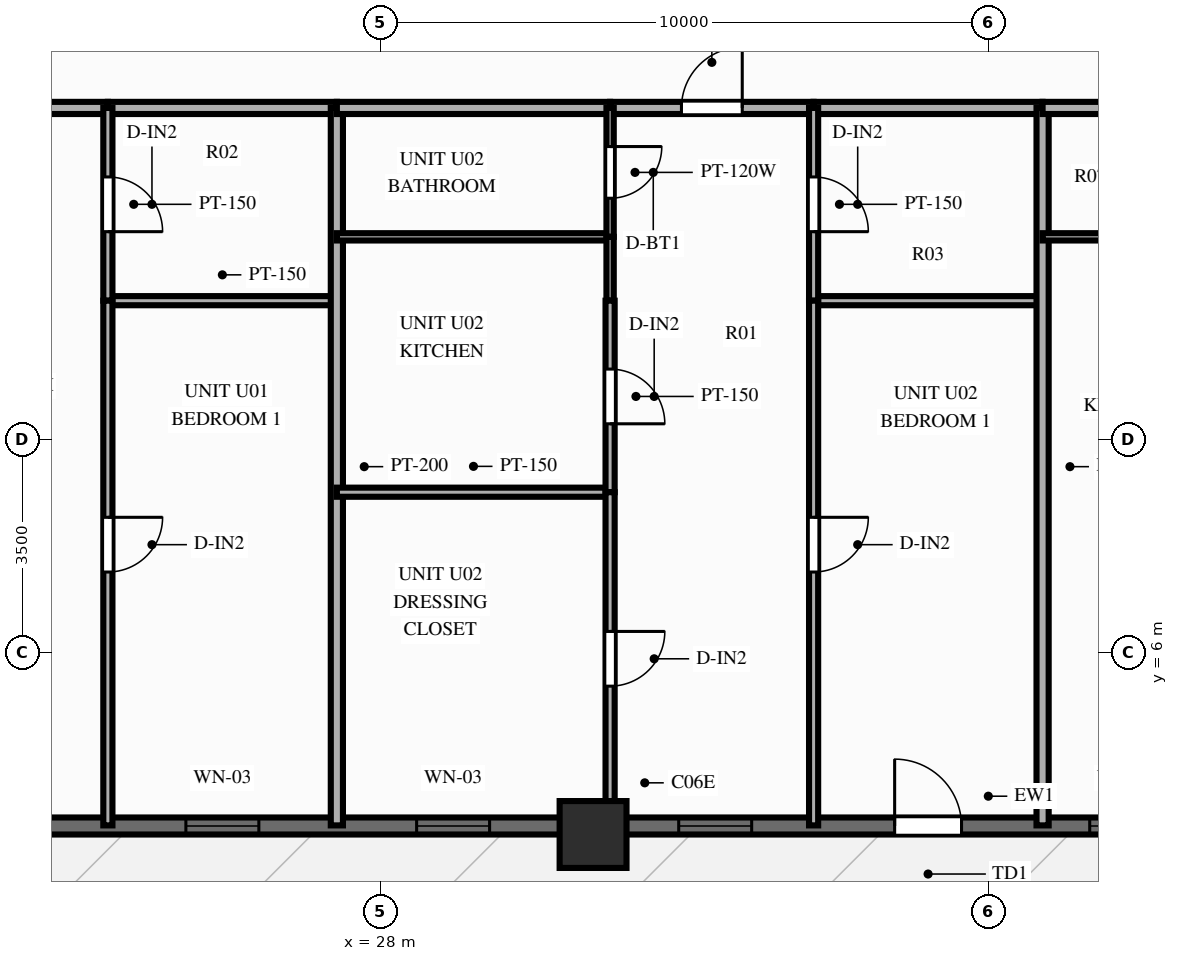
"""IFC4 building model, lengths in metres.
Left out: names, types, materials, properties, quantities, classifications, styles, units other than length and angle.
Written with IfcOpenShell. Run it as: python <this file> out.ifc"""

import sys

from ifc_helpers import new_model, si_unit, direction, frame, frame_2d, origin, origin_2d, place, context, subcontext, project, spatial, rectangle, extrude, source, transform, mapped, element, fill, save


model = new_model("IFC4")
c1 = context("Model", 3, precision=1e-05, world=origin(), true_north=direction((0.0, 1.0)))
c2 = subcontext(c1, "Body", "Model", "MODEL_VIEW")
j1 = project(units=[si_unit("LENGTHUNIT", "METRE"), si_unit("PLANEANGLEUNIT", "RADIAN")], contexts=[c1])
p1 = place(None, origin())
s1 = spatial("IfcSite", under=j1, at=p1, CompositionType="ELEMENT")
p2 = place(p1, origin())
s2 = spatial("IfcBuilding", under=s1, at=p2, CompositionType="ELEMENT")
p3 = place(p2, frame((0.0, 0.0, 34.4)))
s3 = spatial("IfcBuildingStorey", under=s2, at=p3, CompositionType="ELEMENT", Elevation=34.4)
m1 = source(origin(), c2, "Body", "SweptSolid", [
    extrude(rectangle(XDim=1.1, YDim=1.1, at=origin_2d()), origin(), (0.0, 0.0, 1.0), 3.0),
])
p4 = place(p3, frame((31.5, 3.0, 0.0), z_axis=(0.0, 0.0, 1.0), x_axis=(1.0, 0.0, 0.0)))
e1 = element("IfcColumn", 1, at=p4, inside=s3, PredefinedType="COLUMN", context=c2, shape_type="MappedRepresentation", body=[
    mapped(m1, transform((0.0, 0.0, 0.0), scale=1.0)),
])
p5 = place(p3, frame((15.5, 3.14, 0.0), z_axis=(0.0, 0.0, 1.0), x_axis=(1.0, 0.0, 0.0)))
e2 = element("IfcWall", 2, at=p5, inside=s3, PredefinedType="SOLIDWALL", context=c2, shape_type="SweptSolid", body=[
    extrude(rectangle(XDim=45.0, YDim=0.28, at=frame_2d((22.5, 0.0))), origin(), (0.0, 0.0, 1.0), 2.28),
])
p6 = place(p5, frame((1.06, 0.0, 0.25)))
e3 = element("IfcOpeningElement", 3, at=p6, cuts=e2, PredefinedType="OPENING", context=c2, shape_type="SweptSolid", body=[
    extrude(rectangle(XDim=1.2, YDim=1.5, at=frame_2d((0.6, 0.75))), frame((0.0, 0.152, 0.0), z_axis=(0.0, -1.0, 0.0), x_axis=(1.0, 0.0, 0.0)), (0.0, 0.0, 1.0), 0.304),
])
p7 = place(p5, frame((4.875, 0.0, 0.25)))
e4 = element("IfcOpeningElement", 4, at=p7, cuts=e2, PredefinedType="OPENING", context=c2, shape_type="SweptSolid", body=[
    extrude(rectangle(XDim=1.2, YDim=1.5, at=frame_2d((0.6, 0.75))), frame((0.0, 0.152, 0.0), z_axis=(0.0, -1.0, 0.0), x_axis=(1.0, 0.0, 0.0)), (0.0, 0.0, 1.0), 0.304),
])
p8 = place(p5, frame((9.303, 0.0, 0.25)))
e5 = element("IfcOpeningElement", 5, at=p8, cuts=e2, PredefinedType="OPENING", context=c2, shape_type="SweptSolid", body=[
    extrude(rectangle(XDim=1.2, YDim=1.5, at=frame_2d((0.6, 0.75))), frame((0.0, 0.152, 0.0), z_axis=(0.0, -1.0, 0.0), x_axis=(1.0, 0.0, 0.0)), (0.0, 0.0, 1.0), 0.304),
])
p9 = place(p5, frame((13.098, 0.0, 0.25)))
e6 = element("IfcOpeningElement", 6, at=p9, cuts=e2, PredefinedType="OPENING", context=c2, shape_type="SweptSolid", body=[
    extrude(rectangle(XDim=1.2, YDim=1.5, at=frame_2d((0.6, 0.75))), frame((0.0, 0.152, 0.0), z_axis=(0.0, -1.0, 0.0), x_axis=(1.0, 0.0, 0.0)), (0.0, 0.0, 1.0), 0.304),
])
p10 = place(p5, frame((17.408, 0.0, 0.25)))
e7 = element("IfcOpeningElement", 7, at=p10, cuts=e2, PredefinedType="OPENING", context=c2, shape_type="SweptSolid", body=[
    extrude(rectangle(XDim=1.2, YDim=1.5, at=frame_2d((0.6, 0.75))), frame((0.0, 0.152, 0.0), z_axis=(0.0, -1.0, 0.0), x_axis=(1.0, 0.0, 0.0)), (0.0, 0.0, 1.0), 0.304),
])
p11 = place(p5, frame((22.06, 0.0, 0.0), z_axis=(0.0, 0.0, 1.0), x_axis=(-1.0, 0.0, 0.0)))
e8 = element("IfcOpeningElement", 8, at=p11, cuts=e2, PredefinedType="OPENING", context=c2, shape_type="SweptSolid", body=[
    extrude(rectangle(XDim=1.1, YDim=2.15, at=frame_2d((0.55, 1.075))), frame((0.0, 0.152, 0.0), z_axis=(0.0, -1.0, 0.0), x_axis=(1.0, 0.0, 0.0)), (0.0, 0.0, 1.0), 0.304),
])
p12 = place(p5, frame((24.168, 0.0, 0.25)))
e9 = element("IfcOpeningElement", 9, at=p12, cuts=e2, PredefinedType="OPENING", context=c2, shape_type="SweptSolid", body=[
    extrude(rectangle(XDim=1.2, YDim=1.5, at=frame_2d((0.6, 0.75))), frame((0.0, 0.152, 0.0), z_axis=(0.0, -1.0, 0.0), x_axis=(1.0, 0.0, 0.0)), (0.0, 0.0, 1.0), 0.304),
])
p13 = place(p5, frame((26.776, 0.0, 0.25)))
e10 = element("IfcOpeningElement", 10, at=p13, cuts=e2, PredefinedType="OPENING", context=c2, shape_type="SweptSolid", body=[
    extrude(rectangle(XDim=1.2, YDim=1.5, at=frame_2d((0.6, 0.75))), frame((0.0, 0.152, 0.0), z_axis=(0.0, -1.0, 0.0), x_axis=(1.0, 0.0, 0.0)), (0.0, 0.0, 1.0), 0.304),
])
p14 = place(p5, frame((31.613, 0.0, 0.25)))
e11 = element("IfcOpeningElement", 11, at=p14, cuts=e2, PredefinedType="OPENING", context=c2, shape_type="SweptSolid", body=[
    extrude(rectangle(XDim=1.2, YDim=1.5, at=frame_2d((0.6, 0.75))), frame((0.0, 0.152, 0.0), z_axis=(0.0, -1.0, 0.0), x_axis=(1.0, 0.0, 0.0)), (0.0, 0.0, 1.0), 0.304),
])
p15 = place(p5, frame((34.881, 0.0, 0.25)))
e12 = element("IfcOpeningElement", 12, at=p15, cuts=e2, PredefinedType="OPENING", context=c2, shape_type="SweptSolid", body=[
    extrude(rectangle(XDim=1.2, YDim=1.5, at=frame_2d((0.6, 0.75))), frame((0.0, 0.152, 0.0), z_axis=(0.0, -1.0, 0.0), x_axis=(1.0, 0.0, 0.0)), (0.0, 0.0, 1.0), 0.304),
])
p16 = place(p5, frame((38.355, 0.0, 0.25)))
e13 = element("IfcOpeningElement", 13, at=p16, cuts=e2, PredefinedType="OPENING", context=c2, shape_type="SweptSolid", body=[
    extrude(rectangle(XDim=1.2, YDim=1.5, at=frame_2d((0.6, 0.75))), frame((0.0, 0.152, 0.0), z_axis=(0.0, -1.0, 0.0), x_axis=(1.0, 0.0, 0.0)), (0.0, 0.0, 1.0), 0.304),
])
p17 = place(p5, frame((42.232, 0.0, 0.25)))
e14 = element("IfcOpeningElement", 14, at=p17, cuts=e2, PredefinedType="OPENING", context=c2, shape_type="SweptSolid", body=[
    extrude(rectangle(XDim=1.2, YDim=1.5, at=frame_2d((0.6, 0.75))), frame((0.0, 0.152, 0.0), z_axis=(0.0, -1.0, 0.0), x_axis=(1.0, 0.0, 0.0)), (0.0, 0.0, 1.0), 0.304),
])
p18 = place(p3, frame((18.43, 14.95, 0.0), z_axis=(0.0, 0.0, 1.0), x_axis=(1.0, 0.0, 0.0)))
e15 = element("IfcWall", 15, at=p18, inside=s3, PredefinedType="PARTITIONING", context=c2, shape_type="SweptSolid", body=[
    extrude(rectangle(XDim=5.091, YDim=0.2, at=frame_2d((2.545, 0.0))), origin(), (0.0, 0.0, 1.0), 2.79),
])
p19 = place(p18, frame((2.045, 0.0, 0.0)))
e16 = element("IfcOpeningElement", 16, at=p19, cuts=e15, PredefinedType="OPENING", context=c2, shape_type="SweptSolid", body=[
    extrude(rectangle(XDim=1.0, YDim=2.15, at=frame_2d((0.5, 1.075))), frame((0.0, 0.112, 0.0), z_axis=(0.0, -1.0, 0.0), x_axis=(1.0, 0.0, 0.0)), (0.0, 0.0, 1.0), 0.224),
])
p20 = place(p3, frame((23.521, 14.95, 0.0), z_axis=(0.0, 0.0, 1.0), x_axis=(1.0, 0.0, 0.0)))
e17 = element("IfcWall", 17, at=p20, inside=s3, PredefinedType="PARTITIONING", context=c2, shape_type="SweptSolid", body=[
    extrude(rectangle(XDim=3.766, YDim=0.2, at=frame_2d((1.883, 0.0))), origin(), (0.0, 0.0, 1.0), 2.79),
])
p21 = place(p3, frame((23.521, 11.78, 0.0), z_axis=(0.0, 0.0, 1.0), x_axis=(1.0, 0.0, 0.0)))
e18 = element("IfcWall", 18, at=p21, inside=s3, PredefinedType="PARTITIONING", context=c2, shape_type="SweptSolid", body=[
    extrude(rectangle(XDim=3.766, YDim=0.15, at=frame_2d((1.883, 0.0))), origin(), (0.0, 0.0, 1.0), 2.79),
])
p22 = place(p3, frame((23.521, 14.95, 0.0), z_axis=(0.0, 0.0, 1.0), x_axis=(0.0, -1.0, 0.0)))
e19 = element("IfcWall", 19, at=p22, inside=s3, PredefinedType="PARTITIONING", context=c2, shape_type="SweptSolid", body=[
    extrude(rectangle(XDim=3.17, YDim=0.15, at=frame_2d((1.585, 0.0))), origin(), (0.0, 0.0, 1.0), 2.79),
])
p23 = place(p22, frame((1.135, 0.0, 0.0)))
e20 = element("IfcOpeningElement", 20, at=p23, cuts=e19, PredefinedType="OPENING", context=c2, shape_type="SweptSolid", body=[
    extrude(rectangle(XDim=0.9, YDim=2.1, at=frame_2d((0.45, 1.05))), frame((0.0, 0.087, 0.0), z_axis=(0.0, -1.0, 0.0), x_axis=(1.0, 0.0, 0.0)), (0.0, 0.0, 1.0), 0.174),
])
p24 = place(p3, frame((23.521, 11.78, 0.0), z_axis=(0.0, 0.0, 1.0), x_axis=(0.0, -1.0, 0.0)))
e21 = element("IfcWall", 21, at=p24, inside=s3, PredefinedType="PARTITIONING", context=c2, shape_type="SweptSolid", body=[
    extrude(rectangle(XDim=8.63, YDim=0.15, at=frame_2d((4.315, 0.0))), origin(), (0.0, 0.0, 1.0), 2.79),
])
p25 = place(p24, frame((3.563, 0.0, 0.0)))
e22 = element("IfcOpeningElement", 22, at=p25, cuts=e21, PredefinedType="OPENING", context=c2, shape_type="SweptSolid", body=[
    extrude(rectangle(XDim=0.9, YDim=2.1, at=frame_2d((0.45, 1.05))), frame((0.0, 0.087, 0.0), z_axis=(0.0, -1.0, 0.0), x_axis=(1.0, 0.0, 0.0)), (0.0, 0.0, 1.0), 0.174),
])
p26 = place(p3, frame((27.286, 14.95, 0.0), z_axis=(0.0, 0.0, 1.0), x_axis=(0.0, -1.0, 0.0)))
e23 = element("IfcWall", 23, at=p26, inside=s3, PredefinedType="PARTITIONING", context=c2, shape_type="SweptSolid", body=[
    extrude(rectangle(XDim=11.8, YDim=0.2, at=frame_2d((5.9, 0.0))), origin(), (0.0, 0.0, 1.0), 2.79),
])
p27 = place(p3, frame((27.286, 14.95, 0.0), z_axis=(0.0, 0.0, 1.0), x_axis=(1.0, 0.0, 0.0)))
e24 = element("IfcWall", 24, at=p27, inside=s3, PredefinedType="PARTITIONING", context=c2, shape_type="SweptSolid", body=[
    extrude(rectangle(XDim=4.494, YDim=0.2, at=frame_2d((2.247, 0.0))), origin(), (0.0, 0.0, 1.0), 2.79),
])
p28 = place(p3, frame((31.78, 14.95, 0.0), z_axis=(0.0, 0.0, 1.0), x_axis=(1.0, 0.0, 0.0)))
e25 = element("IfcWall", 25, at=p28, inside=s3, PredefinedType="PARTITIONING", context=c2, shape_type="SweptSolid", body=[
    extrude(rectangle(XDim=3.347, YDim=0.2, at=frame_2d((1.673, 0.0))), origin(), (0.0, 0.0, 1.0), 2.79),
])
p29 = place(p28, frame((1.173, 0.0, 0.0)))
e26 = element("IfcOpeningElement", 26, at=p29, cuts=e25, PredefinedType="OPENING", context=c2, shape_type="SweptSolid", body=[
    extrude(rectangle(XDim=1.0, YDim=2.15, at=frame_2d((0.5, 1.075))), frame((0.0, 0.112, 0.0), z_axis=(0.0, -1.0, 0.0), x_axis=(1.0, 0.0, 0.0)), (0.0, 0.0, 1.0), 0.224),
])
p30 = place(p3, frame((35.127, 14.95, 0.0), z_axis=(0.0, 0.0, 1.0), x_axis=(1.0, 0.0, 0.0)))
e27 = element("IfcWall", 27, at=p30, inside=s3, PredefinedType="PARTITIONING", context=c2, shape_type="SweptSolid", body=[
    extrude(rectangle(XDim=3.766, YDim=0.2, at=frame_2d((1.883, 0.0))), origin(), (0.0, 0.0, 1.0), 2.79),
])
p31 = place(p3, frame((27.286, 12.83, 0.0), z_axis=(0.0, 0.0, 1.0), x_axis=(1.0, 0.0, 0.0)))
e28 = element("IfcWall", 28, at=p31, inside=s3, PredefinedType="PARTITIONING", context=c2, shape_type="SweptSolid", body=[
    extrude(rectangle(XDim=4.494, YDim=0.12, at=frame_2d((2.247, 0.0))), origin(), (0.0, 0.0, 1.0), 2.79),
])
p32 = place(p3, frame((35.127, 11.78, 0.0), z_axis=(0.0, 0.0, 1.0), x_axis=(1.0, 0.0, 0.0)))
e29 = element("IfcWall", 29, at=p32, inside=s3, PredefinedType="PARTITIONING", context=c2, shape_type="SweptSolid", body=[
    extrude(rectangle(XDim=3.766, YDim=0.15, at=frame_2d((1.883, 0.0))), origin(), (0.0, 0.0, 1.0), 2.79),
])
p33 = place(p3, frame((31.78, 14.95, 0.0), z_axis=(0.0, 0.0, 1.0), x_axis=(0.0, -1.0, 0.0)))
e30 = element("IfcWall", 30, at=p33, inside=s3, PredefinedType="PARTITIONING", context=c2, shape_type="SweptSolid", body=[
    extrude(rectangle(XDim=2.12, YDim=0.12, at=frame_2d((1.06, 0.0))), origin(), (0.0, 0.0, 1.0), 2.79),
])
p34 = place(p33, frame((0.635, 0.0, 0.0)))
e31 = element("IfcOpeningElement", 31, at=p34, cuts=e30, PredefinedType="OPENING", context=c2, shape_type="SweptSolid", body=[
    extrude(rectangle(XDim=0.85, YDim=2.05, at=frame_2d((0.425, 1.025))), frame((0.0, 0.072, 0.0), z_axis=(0.0, -1.0, 0.0), x_axis=(1.0, 0.0, 0.0)), (0.0, 0.0, 1.0), 0.144),
])
p35 = place(p3, frame((31.78, 12.83, 0.0), z_axis=(0.0, 0.0, 1.0), x_axis=(0.0, -1.0, 0.0)))
e32 = element("IfcWall", 32, at=p35, inside=s3, PredefinedType="PARTITIONING", context=c2, shape_type="SweptSolid", body=[
    extrude(rectangle(XDim=1.05, YDim=0.12, at=frame_2d((0.525, 0.0))), origin(), (0.0, 0.0, 1.0), 2.79),
])
p36 = place(p3, frame((27.286, 8.63, 0.0), z_axis=(0.0, 0.0, 1.0), x_axis=(1.0, 0.0, 0.0)))
e33 = element("IfcWall", 33, at=p36, inside=s3, PredefinedType="PARTITIONING", context=c2, shape_type="SweptSolid", body=[
    extrude(rectangle(XDim=4.494, YDim=0.15, at=frame_2d((2.247, 0.0))), origin(), (0.0, 0.0, 1.0), 2.79),
])
p37 = place(p3, frame((31.78, 11.78, 0.0), z_axis=(0.0, 0.0, 1.0), x_axis=(0.0, -1.0, 0.0)))
e34 = element("IfcWall", 34, at=p37, inside=s3, PredefinedType="PARTITIONING", context=c2, shape_type="SweptSolid", body=[
    extrude(rectangle(XDim=3.15, YDim=0.15, at=frame_2d((1.575, 0.0))), origin(), (0.0, 0.0, 1.0), 2.79),
])
p38 = place(p37, frame((1.125, 0.0, 0.0)))
e35 = element("IfcOpeningElement", 35, at=p38, cuts=e34, PredefinedType="OPENING", context=c2, shape_type="SweptSolid", body=[
    extrude(rectangle(XDim=0.9, YDim=2.1, at=frame_2d((0.45, 1.05))), frame((0.0, 0.087, 0.0), z_axis=(0.0, -1.0, 0.0), x_axis=(1.0, 0.0, 0.0)), (0.0, 0.0, 1.0), 0.174),
])
p39 = place(p3, frame((31.78, 8.63, 0.0), z_axis=(0.0, 0.0, 1.0), x_axis=(0.0, -1.0, 0.0)))
e36 = element("IfcWall", 36, at=p39, inside=s3, PredefinedType="PARTITIONING", context=c2, shape_type="SweptSolid", body=[
    extrude(rectangle(XDim=5.48, YDim=0.15, at=frame_2d((2.74, 0.0))), origin(), (0.0, 0.0, 1.0), 2.79),
])
p40 = place(p39, frame((2.29, 0.0, 0.0)))
e37 = element("IfcOpeningElement", 37, at=p40, cuts=e36, PredefinedType="OPENING", context=c2, shape_type="SweptSolid", body=[
    extrude(rectangle(XDim=0.9, YDim=2.1, at=frame_2d((0.45, 1.05))), frame((0.0, 0.087, 0.0), z_axis=(0.0, -1.0, 0.0), x_axis=(1.0, 0.0, 0.0)), (0.0, 0.0, 1.0), 0.174),
])
p41 = place(p3, frame((35.127, 14.95, 0.0), z_axis=(0.0, 0.0, 1.0), x_axis=(0.0, -1.0, 0.0)))
e38 = element("IfcWall", 38, at=p41, inside=s3, PredefinedType="PARTITIONING", context=c2, shape_type="SweptSolid", body=[
    extrude(rectangle(XDim=3.17, YDim=0.15, at=frame_2d((1.585, 0.0))), origin(), (0.0, 0.0, 1.0), 2.79),
])
p42 = place(p41, frame((1.135, 0.0, 0.0)))
e39 = element("IfcOpeningElement", 39, at=p42, cuts=e38, PredefinedType="OPENING", context=c2, shape_type="SweptSolid", body=[
    extrude(rectangle(XDim=0.9, YDim=2.1, at=frame_2d((0.45, 1.05))), frame((0.0, 0.087, 0.0), z_axis=(0.0, -1.0, 0.0), x_axis=(1.0, 0.0, 0.0)), (0.0, 0.0, 1.0), 0.174),
])
p43 = place(p3, frame((35.127, 11.78, 0.0), z_axis=(0.0, 0.0, 1.0), x_axis=(0.0, -1.0, 0.0)))
e40 = element("IfcWall", 40, at=p43, inside=s3, PredefinedType="PARTITIONING", context=c2, shape_type="SweptSolid", body=[
    extrude(rectangle(XDim=8.63, YDim=0.15, at=frame_2d((4.315, 0.0))), origin(), (0.0, 0.0, 1.0), 2.79),
])
p44 = place(p43, frame((3.563, 0.0, 0.0)))
e41 = element("IfcOpeningElement", 41, at=p44, cuts=e40, PredefinedType="OPENING", context=c2, shape_type="SweptSolid", body=[
    extrude(rectangle(XDim=0.9, YDim=2.1, at=frame_2d((0.45, 1.05))), frame((0.0, 0.087, 0.0), z_axis=(0.0, -1.0, 0.0), x_axis=(1.0, 0.0, 0.0)), (0.0, 0.0, 1.0), 0.174),
])
p45 = place(p3, frame((38.893, 14.95, 0.0), z_axis=(0.0, 0.0, 1.0), x_axis=(0.0, -1.0, 0.0)))
e42 = element("IfcWall", 42, at=p45, inside=s3, PredefinedType="PARTITIONING", context=c2, shape_type="SweptSolid", body=[
    extrude(rectangle(XDim=11.8, YDim=0.2, at=frame_2d((5.9, 0.0))), origin(), (0.0, 0.0, 1.0), 2.79),
])
p46 = place(p3, frame((38.893, 14.95, 0.0), z_axis=(0.0, 0.0, 1.0), x_axis=(1.0, 0.0, 0.0)))
e43 = element("IfcWall", 43, at=p46, inside=s3, PredefinedType="PARTITIONING", context=c2, shape_type="SweptSolid", body=[
    extrude(rectangle(XDim=2.75, YDim=0.2, at=frame_2d((1.375, 0.0))), origin(), (0.0, 0.0, 1.0), 2.79),
])
p47 = place(p3, frame((38.893, 12.83, 0.0), z_axis=(0.0, 0.0, 1.0), x_axis=(1.0, 0.0, 0.0)))
e44 = element("IfcWall", 44, at=p47, inside=s3, PredefinedType="PARTITIONING", context=c2, shape_type="SweptSolid", body=[
    extrude(rectangle(XDim=2.75, YDim=0.12, at=frame_2d((1.375, 0.0))), origin(), (0.0, 0.0, 1.0), 2.79),
])
m2 = source(origin(), c2, "Body", "SweptSolid", [
    extrude(rectangle(XDim=1.2, YDim=1.5, at=frame_2d((0.6, 0.75))), frame((0.0, 0.03, 0.0), z_axis=(0.0, -1.0, 0.0), x_axis=(1.0, 0.0, 0.0)), (0.0, 0.0, 1.0), 0.06),
])
p48 = place(p8, origin())
e45 = element("IfcWindow", 45, at=p48, inside=s3, PartitioningType="SINGLE_PANEL", PredefinedType="WINDOW", context=c2, shape_type="MappedRepresentation", body=[
    mapped(m2, transform((0.0, 0.0, 0.0), scale=1.0)),
])
fill(e5, e45)
p49 = place(p9, origin())
e46 = element("IfcWindow", 46, at=p49, inside=s3, PartitioningType="SINGLE_PANEL", PredefinedType="WINDOW", context=c2, shape_type="MappedRepresentation", body=[
    mapped(m2, transform((0.0, 0.0, 0.0), scale=1.0)),
])
fill(e6, e46)
p50 = place(p10, origin())
e47 = element("IfcWindow", 47, at=p50, inside=s3, PartitioningType="SINGLE_PANEL", PredefinedType="WINDOW", context=c2, shape_type="MappedRepresentation", body=[
    mapped(m2, transform((0.0, 0.0, 0.0), scale=1.0)),
])
fill(e7, e47)
m3 = source(origin(), c2, "Body", "SweptSolid", [
    extrude(rectangle(XDim=1.1, YDim=2.15, at=frame_2d((0.55, 1.075))), frame((0.0, 0.025, 0.0), z_axis=(0.0, -1.0, 0.0), x_axis=(1.0, 0.0, 0.0)), (0.0, 0.0, 1.0), 0.05),
])
p51 = place(p11, origin())
e48 = element("IfcDoor", 48, at=p51, inside=s3, OperationType="SINGLE_SWING_RIGHT", PredefinedType="DOOR", context=c2, shape_type="MappedRepresentation", body=[
    mapped(m3, transform((0.0, 0.0, 0.0), scale=1.0)),
])
fill(e8, e48)
p52 = place(p12, origin())
e49 = element("IfcWindow", 49, at=p52, inside=s3, PartitioningType="SINGLE_PANEL", PredefinedType="WINDOW", context=c2, shape_type="MappedRepresentation", body=[
    mapped(m2, transform((0.0, 0.0, 0.0), scale=1.0)),
])
fill(e9, e49)
m4 = source(origin(), c2, "Body", "SweptSolid", [
    extrude(rectangle(XDim=0.9, YDim=2.1, at=frame_2d((0.45, 1.05))), frame((0.0, 0.025, 0.0), z_axis=(0.0, -1.0, 0.0), x_axis=(1.0, 0.0, 0.0)), (0.0, 0.0, 1.0), 0.05),
])
p53 = place(p23, origin())
e50 = element("IfcDoor", 50, at=p53, inside=s3, OperationType="SINGLE_SWING_RIGHT", PredefinedType="DOOR", context=c2, shape_type="MappedRepresentation", body=[
    mapped(m4, transform((0.0, 0.0, 0.0), scale=1.0)),
])
fill(e20, e50)
p54 = place(p25, origin())
e51 = element("IfcDoor", 51, at=p54, inside=s3, OperationType="SINGLE_SWING_LEFT", PredefinedType="DOOR", context=c2, shape_type="MappedRepresentation", body=[
    mapped(m4, transform((0.0, 0.0, 0.0), scale=1.0)),
])
fill(e22, e51)
m5 = source(origin(), c2, "Body", "SweptSolid", [
    extrude(rectangle(XDim=1.0, YDim=2.15, at=frame_2d((0.5, 1.075))), frame((0.0, 0.025, 0.0), z_axis=(0.0, -1.0, 0.0), x_axis=(1.0, 0.0, 0.0)), (0.0, 0.0, 1.0), 0.05),
])
p55 = place(p29, origin())
e52 = element("IfcDoor", 52, at=p55, inside=s3, OperationType="SINGLE_SWING_RIGHT", PredefinedType="DOOR", context=c2, shape_type="MappedRepresentation", body=[
    mapped(m5, transform((0.0, 0.0, 0.0), scale=1.0)),
])
fill(e26, e52)
m6 = source(origin(), c2, "Body", "SweptSolid", [
    extrude(rectangle(XDim=0.85, YDim=2.05, at=frame_2d((0.425, 1.025))), frame((0.0, 0.025, 0.0), z_axis=(0.0, -1.0, 0.0), x_axis=(1.0, 0.0, 0.0)), (0.0, 0.0, 1.0), 0.05),
])
p56 = place(p34, origin())
e53 = element("IfcDoor", 53, at=p56, inside=s3, OperationType="SINGLE_SWING_LEFT", PredefinedType="DOOR", context=c2, shape_type="MappedRepresentation", body=[
    mapped(m6, transform((0.0, 0.0, 0.0), scale=1.0)),
])
fill(e31, e53)
p57 = place(p38, origin())
e54 = element("IfcDoor", 54, at=p57, inside=s3, OperationType="SINGLE_SWING_RIGHT", PredefinedType="DOOR", context=c2, shape_type="MappedRepresentation", body=[
    mapped(m4, transform((0.0, 0.0, 0.0), scale=1.0)),
])
fill(e35, e54)
p58 = place(p40, origin())
e55 = element("IfcDoor", 55, at=p58, inside=s3, OperationType="SINGLE_SWING_LEFT", PredefinedType="DOOR", context=c2, shape_type="MappedRepresentation", body=[
    mapped(m4, transform((0.0, 0.0, 0.0), scale=1.0)),
])
fill(e37, e55)
p59 = place(p42, origin())
e56 = element("IfcDoor", 56, at=p59, inside=s3, OperationType="SINGLE_SWING_RIGHT", PredefinedType="DOOR", context=c2, shape_type="MappedRepresentation", body=[
    mapped(m4, transform((0.0, 0.0, 0.0), scale=1.0)),
])
fill(e39, e56)
p60 = place(p44, origin())
e57 = element("IfcDoor", 57, at=p60, inside=s3, OperationType="SINGLE_SWING_LEFT", PredefinedType="DOOR", context=c2, shape_type="MappedRepresentation", body=[
    mapped(m4, transform((0.0, 0.0, 0.0), scale=1.0)),
])
fill(e41, e57)
save(model, sys.argv[1])
